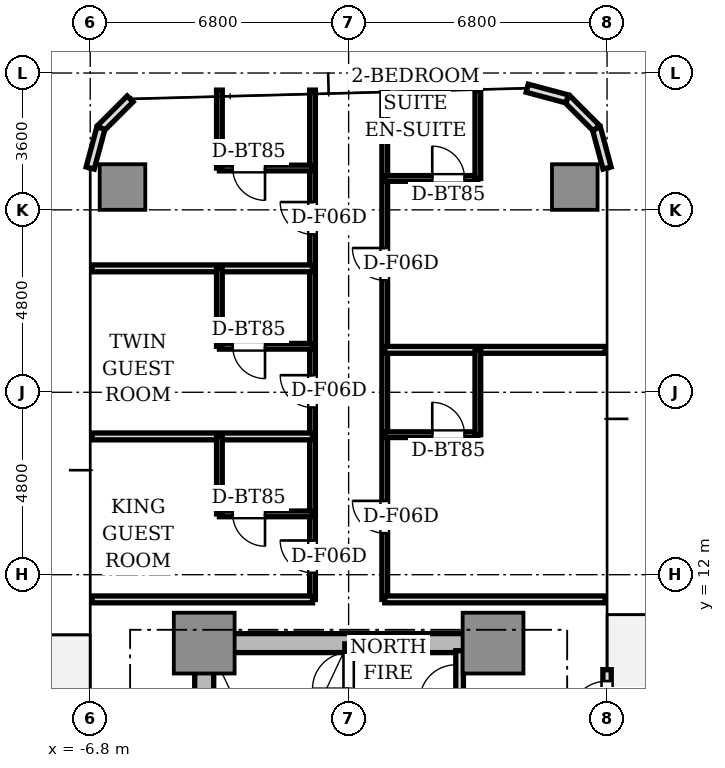
"""IFC4 building model, lengths in metres.
Left out: names, types, materials, properties, quantities, classifications, styles, units other than length and angle.
Written with IfcOpenShell. Run it as: python <this file> out.ifc"""

import sys

from ifc_helpers import new_model, si_unit, direction, frame, frame_2d, origin, origin_2d, place, context, subcontext, project, spatial, rectangle, extrude, source, transform, mapped, element, fill, save


model = new_model("IFC4")
c1 = context("Model", 3, precision=1e-05, world=origin(), true_north=direction((0.0, 1.0)))
c2 = subcontext(c1, "Body", "Model", "MODEL_VIEW")
j1 = project(units=[si_unit("LENGTHUNIT", "METRE"), si_unit("PLANEANGLEUNIT", "RADIAN")], contexts=[c1])
p1 = place(None, origin())
s1 = spatial("IfcSite", under=j1, at=p1, CompositionType="ELEMENT")
p2 = place(p1, origin())
s2 = spatial("IfcBuilding", under=s1, at=p2, CompositionType="ELEMENT")
p3 = place(p2, frame((0.0, 0.0, 71.15)))
s3 = spatial("IfcBuildingStorey", under=s2, at=p3, CompositionType="ELEMENT", Elevation=71.15)
p4 = place(p3, frame((-3.55, 10.2, 0.0), z_axis=(0.0, 0.0, 1.0), x_axis=(1.0, 0.0, 0.0)))
e1 = element("IfcWall", 1, at=p4, inside=s3, PredefinedType="SHEAR", context=c2, shape_type="SweptSolid", body=[
    extrude(rectangle(XDim=7.1, YDim=0.5, at=frame_2d((3.55, 0.0))), origin(), (0.0, 0.0, 1.0), 3.03),
])
p5 = place(p3, frame((-3.8, 2.85, 0.0), z_axis=(0.0, 0.0, 1.0), x_axis=(0.0, 1.0, 0.0)))
e2 = element("IfcWall", 2, at=p5, inside=s3, PredefinedType="SHEAR", context=c2, shape_type="SweptSolid", body=[
    extrude(rectangle(XDim=6.9, YDim=0.5, at=frame_2d((3.45, 0.0))), origin(), (0.0, 0.0, 1.0), 3.03),
])
m1 = source(origin(), c2, "Body", "SweptSolid", [
    extrude(rectangle(XDim=1.6, YDim=1.6, at=origin_2d()), origin(), (0.0, 0.0, 1.0), 3.03),
])
for number, where, z_axis, x_axis in (
    (3, (-3.8, 10.2, 0.0), (0.0, 0.0, 1.0), (1.0, 0.0, 0.0)),
    (4, (3.8, 10.2, 0.0), (0.0, 0.0, 1.0), (1.0, 0.0, 0.0)),
):
    element("IfcColumn", number, at=place(p3, frame(where, z_axis=z_axis, x_axis=x_axis)), inside=s3, PredefinedType="COLUMN", context=c2, shape_type="MappedRepresentation", body=[
        mapped(m1, transform((0.0, 0.0, 0.0), scale=1.0)),
    ])
m2 = source(origin(), c2, "Body", "SweptSolid", [
    extrude(rectangle(XDim=1.2, YDim=1.2, at=origin_2d()), origin(), (0.0, 0.0, 1.0), 3.03),
])
for number, where, z_axis, x_axis in (
    (5, (5.95, 22.2, 0.0), (0.0, 0.0, 1.0), (1.0, 0.0, 0.0)),
    (6, (-5.95, 22.2, 0.0), (0.0, 0.0, 1.0), (1.0, 0.0, 0.0)),
):
    element("IfcColumn", number, at=place(p3, frame(where, z_axis=z_axis, x_axis=x_axis)), inside=s3, PredefinedType="COLUMN", context=c2, shape_type="MappedRepresentation", body=[
        mapped(m2, transform((0.0, 0.0, 0.0), scale=1.0)),
    ])
p6 = place(p3, frame((6.8, 6.8, 0.0), z_axis=(0.0, 0.0, 1.0), x_axis=(0.0, 1.0, 0.0)))
e7 = element("IfcWall", 7, at=p6, inside=s3, PredefinedType="STANDARD", context=c2, shape_type="SweptSolid", body=[
    extrude(rectangle(XDim=2.7, YDim=0.22, at=frame_2d((1.35, 0.0))), origin(), (0.0, 0.0, 1.0), 3.03),
])
p7 = place(p6, frame((1.4, 0.0, 0.0)))
e8 = element("IfcOpeningElement", 8, at=p7, cuts=e7, PredefinedType="OPENING", context=c2, shape_type="SweptSolid", body=[
    extrude(rectangle(XDim=1.0, YDim=2.2, at=frame_2d((0.5, 1.1))), frame((0.0, 0.12, 0.0), z_axis=(0.0, -1.0, 0.0), x_axis=(1.0, 0.0, 0.0)), (0.0, 0.0, 1.0), 0.24),
])
for number, where, z_axis, x_axis in (
    (9, (6.8, 22.7, 0.0), (0.0, 0.0, 1.0), (-0.259, 0.966, 0.0)),
    (10, (6.519, 23.75, 0.0), (0.0, 0.0, 1.0), (-0.707, 0.707, 0.0)),
    (11, (5.75, 24.519, 0.0), (0.0, 0.0, 1.0), (-0.966, 0.259, 0.0)),
    (12, (-5.75, 24.519, 0.0), (0.0, 0.0, 1.0), (-0.707, -0.707, 0.0)),
    (13, (-6.519, 23.75, 0.0), (0.0, 0.0, 1.0), (-0.259, -0.966, 0.0)),
):
    element("IfcWall", number, at=place(p3, frame(where, z_axis=z_axis, x_axis=x_axis)), inside=s3, PredefinedType="STANDARD", context=c2, shape_type="SweptSolid", body=[
        extrude(rectangle(XDim=1.087, YDim=0.22, at=frame_2d((0.543, 0.0))), origin(), (0.0, 0.0, 1.0), 3.03),
    ])
p8 = place(p3, frame((0.0, 2.5, 0.0), z_axis=(0.0, 0.0, 1.0), x_axis=(0.0, 1.0, 0.0)))
e14 = element("IfcWall", 14, at=p8, inside=s3, PredefinedType="SOLIDWALL", context=c2, shape_type="SweptSolid", body=[
    extrude(rectangle(XDim=7.68, YDim=0.2, at=frame_2d((3.84, 0.0))), origin(), (0.0, 0.0, 1.0), 3.03),
])
p9 = place(p8, frame((6.5, 0.0, 0.0)))
e15 = element("IfcOpeningElement", 15, at=p9, cuts=e14, PredefinedType="OPENING", context=c2, shape_type="SweptSolid", body=[
    extrude(rectangle(XDim=0.95, YDim=2.15, at=frame_2d((0.475, 1.075))), frame((0.0, 0.11, 0.0), z_axis=(0.0, -1.0, 0.0), x_axis=(1.0, 0.0, 0.0)), (0.0, 0.0, 1.0), 0.22),
])
p10 = place(p3, frame((2.92, 8.68, 0.0), z_axis=(0.0, 0.0, 1.0), x_axis=(0.0, 1.0, 0.0)))
e16 = element("IfcWall", 16, at=p10, inside=s3, PredefinedType="SOLIDWALL", context=c2, shape_type="SweptSolid", body=[
    extrude(rectangle(XDim=1.32, YDim=0.2, at=frame_2d((0.66, 0.0))), origin(), (0.0, 0.0, 1.0), 2.58),
])
p11 = place(p3, frame((-0.95, 11.35, 0.0), z_axis=(0.0, 0.0, 1.0), x_axis=(0.0, 1.0, 0.0)))
e17 = element("IfcWall", 17, at=p11, inside=s3, PredefinedType="PARTITIONING", context=c2, shape_type="SweptSolid", body=[
    extrude(rectangle(XDim=13.4, YDim=0.15, at=frame_2d((6.7, 0.0))), origin(), (0.0, 0.0, 1.0), 2.58),
])
p12 = place(p11, frame((0.7, 0.0, 0.0)))
e18 = element("IfcOpeningElement", 18, at=p12, cuts=e17, PredefinedType="OPENING", context=c2, shape_type="SweptSolid", body=[
    extrude(rectangle(XDim=0.85, YDim=2.1, at=frame_2d((0.425, 1.05))), frame((0.0, 0.085, 0.0), z_axis=(0.0, -1.0, 0.0), x_axis=(1.0, 0.0, 0.0)), (0.0, 0.0, 1.0), 0.17),
])
p13 = place(p11, frame((5.049, 0.0, 0.0)))
e19 = element("IfcOpeningElement", 19, at=p13, cuts=e17, PredefinedType="OPENING", context=c2, shape_type="SweptSolid", body=[
    extrude(rectangle(XDim=0.85, YDim=2.1, at=frame_2d((0.425, 1.05))), frame((0.0, 0.085, 0.0), z_axis=(0.0, -1.0, 0.0), x_axis=(1.0, 0.0, 0.0)), (0.0, 0.0, 1.0), 0.17),
])
p14 = place(p11, frame((9.605, 0.0, 0.0)))
e20 = element("IfcOpeningElement", 20, at=p14, cuts=e17, PredefinedType="OPENING", context=c2, shape_type="SweptSolid", body=[
    extrude(rectangle(XDim=0.85, YDim=2.1, at=frame_2d((0.425, 1.05))), frame((0.0, 0.085, 0.0), z_axis=(0.0, -1.0, 0.0), x_axis=(1.0, 0.0, 0.0)), (0.0, 0.0, 1.0), 0.17),
])
p15 = place(p3, frame((0.95, 11.35, 0.0), z_axis=(0.0, 0.0, 1.0), x_axis=(0.0, 1.0, 0.0)))
e21 = element("IfcWall", 21, at=p15, inside=s3, PredefinedType="PARTITIONING", context=c2, shape_type="SweptSolid", body=[
    extrude(rectangle(XDim=13.4, YDim=0.15, at=frame_2d((6.7, 0.0))), origin(), (0.0, 0.0, 1.0), 2.58),
])
p16 = place(p15, frame((1.742, 0.0, 0.0)))
e22 = element("IfcOpeningElement", 22, at=p16, cuts=e21, PredefinedType="OPENING", context=c2, shape_type="SweptSolid", body=[
    extrude(rectangle(XDim=0.85, YDim=2.1, at=frame_2d((0.425, 1.05))), frame((0.0, 0.085, 0.0), z_axis=(0.0, -1.0, 0.0), x_axis=(1.0, 0.0, 0.0)), (0.0, 0.0, 1.0), 0.17),
])
p17 = place(p15, frame((8.396, 0.0, 0.0)))
e23 = element("IfcOpeningElement", 23, at=p17, cuts=e21, PredefinedType="OPENING", context=c2, shape_type="SweptSolid", body=[
    extrude(rectangle(XDim=0.85, YDim=2.1, at=frame_2d((0.425, 1.05))), frame((0.0, 0.085, 0.0), z_axis=(0.0, -1.0, 0.0), x_axis=(1.0, 0.0, 0.0)), (0.0, 0.0, 1.0), 0.17),
])
for number, where, z_axis, x_axis in (
    (24, (-0.95, 11.35, 0.0), (0.0, 0.0, 1.0), (-1.0, 0.0, 0.0)),
    (25, (6.75, 11.35, 0.0), (0.0, 0.0, 1.0), (-1.0, 0.0, 0.0)),
    (26, (-0.95, 15.638, 0.0), (0.0, 0.0, 1.0), (-1.0, 0.0, 0.0)),
):
    element("IfcWall", number, at=place(p3, frame(where, z_axis=z_axis, x_axis=x_axis)), inside=s3, PredefinedType="PARTITIONING", context=c2, shape_type="SweptSolid", body=[
        extrude(rectangle(XDim=5.8, YDim=0.18, at=frame_2d((2.9, 0.0))), origin(), (0.0, 0.0, 1.0), 2.58),
    ])
p18 = place(p3, frame((-0.95, 13.6, 0.0), z_axis=(0.0, 0.0, 1.0), x_axis=(-1.0, 0.0, 0.0)))
e27 = element("IfcWall", 27, at=p18, inside=s3, PredefinedType="PARTITIONING", context=c2, shape_type="SweptSolid", body=[
    extrude(rectangle(XDim=2.45, YDim=0.15, at=frame_2d((1.225, 0.0))), origin(), (0.0, 0.0, 1.0), 2.58),
])
p19 = place(p18, frame((1.25, 0.0, 0.0)))
e28 = element("IfcOpeningElement", 28, at=p19, cuts=e27, PredefinedType="OPENING", context=c2, shape_type="SweptSolid", body=[
    extrude(rectangle(XDim=0.85, YDim=2.1, at=frame_2d((0.425, 1.05))), frame((0.0, 0.085, 0.0), z_axis=(0.0, -1.0, 0.0), x_axis=(1.0, 0.0, 0.0)), (0.0, 0.0, 1.0), 0.17),
])
p20 = place(p3, frame((-3.4, 13.6, 0.0), z_axis=(0.0, 0.0, 1.0), x_axis=(0.0, 1.0, 0.0)))
e29 = element("IfcWall", 29, at=p20, inside=s3, PredefinedType="PARTITIONING", context=c2, shape_type="SweptSolid", body=[
    extrude(rectangle(XDim=2.038, YDim=0.15, at=frame_2d((1.019, 0.0))), origin(), (0.0, 0.0, 1.0), 2.58),
])
p21 = place(p3, frame((-0.95, 20.06, 0.0), z_axis=(0.0, 0.0, 1.0), x_axis=(-1.0, 0.0, 0.0)))
e30 = element("IfcWall", 30, at=p21, inside=s3, PredefinedType="PARTITIONING", context=c2, shape_type="SweptSolid", body=[
    extrude(rectangle(XDim=5.8, YDim=0.18, at=frame_2d((2.9, 0.0))), origin(), (0.0, 0.0, 1.0), 2.58),
])
p22 = place(p3, frame((-0.95, 18.01, 0.0), z_axis=(0.0, 0.0, 1.0), x_axis=(-1.0, 0.0, 0.0)))
e31 = element("IfcWall", 31, at=p22, inside=s3, PredefinedType="PARTITIONING", context=c2, shape_type="SweptSolid", body=[
    extrude(rectangle(XDim=2.45, YDim=0.15, at=frame_2d((1.225, 0.0))), origin(), (0.0, 0.0, 1.0), 2.58),
])
p23 = place(p22, frame((1.25, 0.0, 0.0)))
e32 = element("IfcOpeningElement", 32, at=p23, cuts=e31, PredefinedType="OPENING", context=c2, shape_type="SweptSolid", body=[
    extrude(rectangle(XDim=0.85, YDim=2.1, at=frame_2d((0.425, 1.05))), frame((0.0, 0.085, 0.0), z_axis=(0.0, -1.0, 0.0), x_axis=(1.0, 0.0, 0.0)), (0.0, 0.0, 1.0), 0.17),
])
p24 = place(p3, frame((-3.4, 18.01, 0.0), z_axis=(0.0, 0.0, 1.0), x_axis=(0.0, 1.0, 0.0)))
e33 = element("IfcWall", 33, at=p24, inside=s3, PredefinedType="PARTITIONING", context=c2, shape_type="SweptSolid", body=[
    extrude(rectangle(XDim=2.05, YDim=0.15, at=frame_2d((1.025, 0.0))), origin(), (0.0, 0.0, 1.0), 2.58),
])
p25 = place(p3, frame((-0.95, 22.7, 0.0), z_axis=(0.0, 0.0, 1.0), x_axis=(-1.0, 0.0, 0.0)))
e34 = element("IfcWall", 34, at=p25, inside=s3, PredefinedType="PARTITIONING", context=c2, shape_type="SweptSolid", body=[
    extrude(rectangle(XDim=2.45, YDim=0.15, at=frame_2d((1.225, 0.0))), origin(), (0.0, 0.0, 1.0), 2.58),
])
p26 = place(p25, frame((1.25, 0.0, 0.0)))
e35 = element("IfcOpeningElement", 35, at=p26, cuts=e34, PredefinedType="OPENING", context=c2, shape_type="SweptSolid", body=[
    extrude(rectangle(XDim=0.85, YDim=2.1, at=frame_2d((0.425, 1.05))), frame((0.0, 0.085, 0.0), z_axis=(0.0, -1.0, 0.0), x_axis=(1.0, 0.0, 0.0)), (0.0, 0.0, 1.0), 0.17),
])
p27 = place(p3, frame((-3.4, 22.7, 0.0), z_axis=(0.0, 0.0, 1.0), x_axis=(0.0, 1.0, 0.0)))
e36 = element("IfcWall", 36, at=p27, inside=s3, PredefinedType="PARTITIONING", context=c2, shape_type="SweptSolid", body=[
    extrude(rectangle(XDim=2.05, YDim=0.15, at=frame_2d((1.025, 0.0))), origin(), (0.0, 0.0, 1.0), 2.58),
])
p28 = place(p3, frame((0.95, 17.916, 0.0), z_axis=(0.0, 0.0, 1.0), x_axis=(1.0, 0.0, 0.0)))
e37 = element("IfcWall", 37, at=p28, inside=s3, PredefinedType="PARTITIONING", context=c2, shape_type="SweptSolid", body=[
    extrude(rectangle(XDim=5.8, YDim=0.18, at=frame_2d((2.9, 0.0))), origin(), (0.0, 0.0, 1.0), 2.58),
])
p29 = place(p3, frame((0.95, 15.684, 0.0), z_axis=(0.0, 0.0, 1.0), x_axis=(1.0, 0.0, 0.0)))
e38 = element("IfcWall", 38, at=p29, inside=s3, PredefinedType="PARTITIONING", context=c2, shape_type="SweptSolid", body=[
    extrude(rectangle(XDim=2.45, YDim=0.15, at=frame_2d((1.225, 0.0))), origin(), (0.0, 0.0, 1.0), 2.58),
])
p30 = place(p29, frame((1.25, 0.0, 0.0)))
e39 = element("IfcOpeningElement", 39, at=p30, cuts=e38, PredefinedType="OPENING", context=c2, shape_type="SweptSolid", body=[
    extrude(rectangle(XDim=0.85, YDim=2.1, at=frame_2d((0.425, 1.05))), frame((0.0, 0.085, 0.0), z_axis=(0.0, -1.0, 0.0), x_axis=(1.0, 0.0, 0.0)), (0.0, 0.0, 1.0), 0.17),
])
p31 = place(p3, frame((3.4, 15.684, 0.0), z_axis=(0.0, 0.0, 1.0), x_axis=(0.0, 1.0, 0.0)))
e40 = element("IfcWall", 40, at=p31, inside=s3, PredefinedType="PARTITIONING", context=c2, shape_type="SweptSolid", body=[
    extrude(rectangle(XDim=2.232, YDim=0.15, at=frame_2d((1.116, 0.0))), origin(), (0.0, 0.0, 1.0), 2.58),
])
p32 = place(p3, frame((0.95, 22.426, 0.0), z_axis=(0.0, 0.0, 1.0), x_axis=(1.0, 0.0, 0.0)))
e41 = element("IfcWall", 41, at=p32, inside=s3, PredefinedType="PARTITIONING", context=c2, shape_type="SweptSolid", body=[
    extrude(rectangle(XDim=2.45, YDim=0.15, at=frame_2d((1.225, 0.0))), origin(), (0.0, 0.0, 1.0), 2.5),
])
p33 = place(p32, frame((1.25, 0.0, 0.0)))
e42 = element("IfcOpeningElement", 42, at=p33, cuts=e41, PredefinedType="OPENING", context=c2, shape_type="SweptSolid", body=[
    extrude(rectangle(XDim=0.85, YDim=2.1, at=frame_2d((0.425, 1.05))), frame((0.0, 0.085, 0.0), z_axis=(0.0, -1.0, 0.0), x_axis=(1.0, 0.0, 0.0)), (0.0, 0.0, 1.0), 0.17),
])
p34 = place(p3, frame((3.4, 22.426, 0.0), z_axis=(0.0, 0.0, 1.0), x_axis=(0.0, 1.0, 0.0)))
e43 = element("IfcWall", 43, at=p34, inside=s3, PredefinedType="PARTITIONING", context=c2, shape_type="SweptSolid", body=[
    extrude(rectangle(XDim=2.324, YDim=0.15, at=frame_2d((1.162, 0.0))), origin(), (0.0, 0.0, 1.0), 2.58),
])
m3 = source(origin(), c2, "Body", "SweptSolid", [
    extrude(rectangle(XDim=1.0, YDim=0.05, at=origin_2d()), origin(), (0.0, 0.0, 1.0), 2.2),
])
p35 = place(p7, frame((0.5, 0.0, 0.0)))
e44 = element("IfcDoor", 44, at=p35, inside=s3, OperationType="SINGLE_SWING_LEFT", PredefinedType="DOOR", context=c2, shape_type="MappedRepresentation", body=[
    mapped(m3, transform((0.0, 0.0, 0.0), scale=1.0)),
])
fill(e8, e44)
m4 = source(origin(), c2, "Body", "SweptSolid", [
    extrude(rectangle(XDim=0.95, YDim=0.05, at=origin_2d()), origin(), (0.0, 0.0, 1.0), 2.15),
])
p36 = place(p9, frame((0.475, 0.0, 0.0)))
e45 = element("IfcDoor", 45, at=p36, inside=s3, OperationType="SINGLE_SWING_LEFT", PredefinedType="DOOR", context=c2, shape_type="MappedRepresentation", body=[
    mapped(m4, transform((0.0, 0.0, 0.0), scale=1.0)),
])
fill(e15, e45)
m5 = source(origin(), c2, "Body", "SweptSolid", [
    extrude(rectangle(XDim=0.85, YDim=0.05, at=origin_2d()), origin(), (0.0, 0.0, 1.0), 2.1),
])
p37 = place(p19, frame((0.425, 0.0, 0.0)))
e46 = element("IfcDoor", 46, at=p37, inside=s3, OperationType="SINGLE_SWING_LEFT", PredefinedType="DOOR", context=c2, shape_type="MappedRepresentation", body=[
    mapped(m5, transform((0.0, 0.0, 0.0), scale=1.0)),
])
fill(e28, e46)
p38 = place(p12, frame((0.425, 0.0, 0.0)))
e47 = element("IfcDoor", 47, at=p38, inside=s3, OperationType="SINGLE_SWING_RIGHT", PredefinedType="DOOR", context=c2, shape_type="MappedRepresentation", body=[
    mapped(m5, transform((0.0, 0.0, 0.0), scale=1.0)),
])
fill(e18, e47)
p39 = place(p23, frame((0.425, 0.0, 0.0)))
e48 = element("IfcDoor", 48, at=p39, inside=s3, OperationType="SINGLE_SWING_LEFT", PredefinedType="DOOR", context=c2, shape_type="MappedRepresentation", body=[
    mapped(m5, transform((0.0, 0.0, 0.0), scale=1.0)),
])
fill(e32, e48)
p40 = place(p13, frame((0.425, 0.0, 0.0)))
e49 = element("IfcDoor", 49, at=p40, inside=s3, OperationType="SINGLE_SWING_RIGHT", PredefinedType="DOOR", context=c2, shape_type="MappedRepresentation", body=[
    mapped(m5, transform((0.0, 0.0, 0.0), scale=1.0)),
])
fill(e19, e49)
p41 = place(p26, frame((0.425, 0.0, 0.0)))
e50 = element("IfcDoor", 50, at=p41, inside=s3, OperationType="SINGLE_SWING_LEFT", PredefinedType="DOOR", context=c2, shape_type="MappedRepresentation", body=[
    mapped(m5, transform((0.0, 0.0, 0.0), scale=1.0)),
])
fill(e35, e50)
p42 = place(p14, frame((0.425, 0.0, 0.0)))
e51 = element("IfcDoor", 51, at=p42, inside=s3, OperationType="SINGLE_SWING_RIGHT", PredefinedType="DOOR", context=c2, shape_type="MappedRepresentation", body=[
    mapped(m5, transform((0.0, 0.0, 0.0), scale=1.0)),
])
fill(e20, e51)
p43 = place(p30, frame((0.425, 0.0, 0.0)))
e52 = element("IfcDoor", 52, at=p43, inside=s3, OperationType="SINGLE_SWING_LEFT", PredefinedType="DOOR", context=c2, shape_type="MappedRepresentation", body=[
    mapped(m5, transform((0.0, 0.0, 0.0), scale=1.0)),
])
fill(e39, e52)
p44 = place(p16, frame((0.425, 0.0, 0.0)))
e53 = element("IfcDoor", 53, at=p44, inside=s3, OperationType="SINGLE_SWING_RIGHT", PredefinedType="DOOR", context=c2, shape_type="MappedRepresentation", body=[
    mapped(m5, transform((0.0, 0.0, 0.0), scale=1.0)),
])
fill(e22, e53)
p45 = place(p33, frame((0.425, 0.0, 0.0)))
e54 = element("IfcDoor", 54, at=p45, inside=s3, OperationType="SINGLE_SWING_LEFT", PredefinedType="DOOR", context=c2, shape_type="MappedRepresentation", body=[
    mapped(m5, transform((0.0, 0.0, 0.0), scale=1.0)),
])
fill(e42, e54)
p46 = place(p17, frame((0.425, 0.0, 0.0)))
e55 = element("IfcDoor", 55, at=p46, inside=s3, OperationType="SINGLE_SWING_RIGHT", PredefinedType="DOOR", context=c2, shape_type="MappedRepresentation", body=[
    mapped(m5, transform((0.0, 0.0, 0.0), scale=1.0)),
])
fill(e23, e55)
save(model, sys.argv[1])
